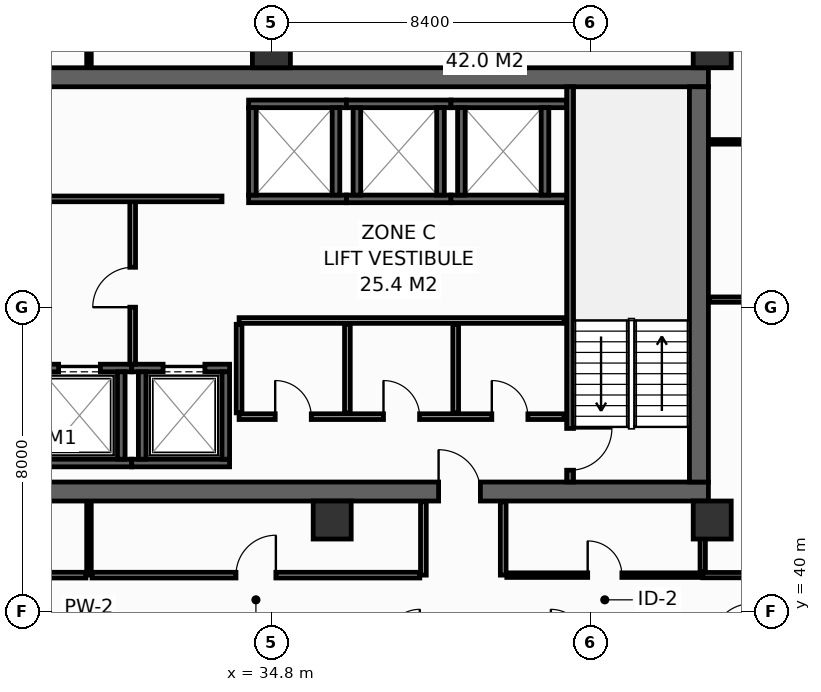
"""IFC4 building model, lengths in metres.
Left out: names, types, materials, properties, quantities, classifications, styles, units other than length and angle.
Written with IfcOpenShell. Run it as: python <this file> out.ifc"""

import sys

from ifc_helpers import new_model, si_unit, direction, frame, frame_2d, origin, origin_2d, place, context, subcontext, project, spatial, rectangle, hollow_rectangle, extrude, element, fill, save


model = new_model("IFC4")
c1 = context("Model", 3, precision=1e-05, world=origin(), true_north=direction((0.0, 1.0)))
c2 = subcontext(c1, "Body", "Model", "MODEL_VIEW")
j1 = project(units=[si_unit("LENGTHUNIT", "METRE"), si_unit("PLANEANGLEUNIT", "RADIAN")], contexts=[c1])
p1 = place(None, origin())
s1 = spatial("IfcSite", under=j1, at=p1, CompositionType="ELEMENT")
p2 = place(p1, origin())
s2 = spatial("IfcBuilding", under=s1, at=p2, CompositionType="ELEMENT")
p3 = place(p2, frame((0.0, 0.0, 141.0)))
s3 = spatial("IfcBuildingStorey", under=s2, at=p3, CompositionType="ELEMENT", Elevation=141.0)
p4 = place(p3, frame((13.6, 43.15, 0.0), z_axis=(0.0, 0.0, 1.0), x_axis=(1.0, 0.0, 0.0)))
e1 = element("IfcWall", 1, at=p4, inside=s3, PredefinedType="SHEAR", context=c2, shape_type="SweptSolid", body=[
    extrude(rectangle(XDim=32.7, YDim=0.5, at=frame_2d((16.35, 0.0))), origin(), (0.0, 0.0, 1.0), 3.55),
])
p5 = place(p4, frame((5.4, 0.0, 0.0)))
e2 = element("IfcOpeningElement", 2, at=p5, cuts=e1, PredefinedType="OPENING", context=c2, shape_type="SweptSolid", body=[
    extrude(rectangle(XDim=1.1, YDim=2.15, at=frame_2d((0.55, 1.075))), frame((0.0, 0.26, 0.0), z_axis=(0.0, -1.0, 0.0), x_axis=(1.0, 0.0, 0.0)), (0.0, 0.0, 1.0), 0.52),
])
p6 = place(p4, frame((25.6, 0.0, 0.0)))
e3 = element("IfcOpeningElement", 3, at=p6, cuts=e1, PredefinedType="OPENING", context=c2, shape_type="SweptSolid", body=[
    extrude(rectangle(XDim=1.1, YDim=2.15, at=frame_2d((0.55, 1.075))), frame((0.0, 0.26, 0.0), z_axis=(0.0, -1.0, 0.0), x_axis=(1.0, 0.0, 0.0)), (0.0, 0.0, 1.0), 0.52),
])
p7 = place(p3, frame((13.6, 54.05, 0.0), z_axis=(0.0, 0.0, 1.0), x_axis=(1.0, 0.0, 0.0)))
e4 = element("IfcWall", 4, at=p7, inside=s3, PredefinedType="SHEAR", context=c2, shape_type="SweptSolid", body=[
    extrude(rectangle(XDim=32.7, YDim=0.5, at=frame_2d((16.35, 0.0))), origin(), (0.0, 0.0, 1.0), 3.55),
])
p8 = place(p3, frame((46.05, 43.4, 0.0), z_axis=(0.0, 0.0, 1.0), x_axis=(0.0, 1.0, 0.0)))
e5 = element("IfcWall", 5, at=p8, inside=s3, PredefinedType="SHEAR", context=c2, shape_type="SweptSolid", body=[
    extrude(rectangle(XDim=10.4, YDim=0.5, at=frame_2d((5.2, 0.0))), origin(), (0.0, 0.0, 1.0), 3.55),
])
for number, where, z_axis, x_axis in (
    (6, (34.8, 54.8, 0.0), (0.0, 0.0, 1.0), (1.0, 0.0, 0.0)),
    (7, (46.4, 54.8, 0.0), (0.0, 0.0, 1.0), (1.0, 0.0, 0.0)),
    (8, (36.4, 42.4, 0.0), (0.0, 0.0, 1.0), (1.0, 0.0, 0.0)),
    (9, (46.4, 42.4, 0.0), (0.0, 0.0, 1.0), (1.0, 0.0, 0.0)),
):
    element("IfcColumn", number, at=place(p3, frame(where, z_axis=z_axis, x_axis=x_axis)), inside=s3, PredefinedType="COLUMN", context=c2, shape_type="SweptSolid", body=[
        extrude(hollow_rectangle(XDim=1.0, YDim=1.0, WallThickness=0.045, at=origin_2d()), origin(), (0.0, 0.0, 1.0), 3.8),
    ])
p9 = place(p3, frame((28.375, 43.9, 0.0), z_axis=(0.0, 0.0, 1.0), x_axis=(1.0, 0.0, 0.0)))
e10 = element("IfcWall", 10, at=p9, inside=s3, PredefinedType="SHEAR", context=c2, shape_type="SweptSolid", body=[
    extrude(rectangle(XDim=2.75, YDim=0.2, at=frame_2d((1.375, 0.0))), origin(), (0.0, 0.0, 1.0), 3.55),
])
p10 = place(p3, frame((28.375, 46.4, 0.0), z_axis=(0.0, 0.0, 1.0), x_axis=(1.0, 0.0, 0.0)))
e11 = element("IfcWall", 11, at=p10, inside=s3, PredefinedType="SHEAR", context=c2, shape_type="SweptSolid", body=[
    extrude(rectangle(XDim=2.75, YDim=0.2, at=frame_2d((1.375, 0.0))), origin(), (0.0, 0.0, 1.0), 3.55),
])
p11 = place(p10, frame((0.825, 0.0, 0.0)))
e12 = element("IfcOpeningElement", 12, at=p11, cuts=e11, PredefinedType="OPENING", context=c2, shape_type="SweptSolid", body=[
    extrude(rectangle(XDim=1.1, YDim=2.2, at=frame_2d((0.55, 1.1))), frame((0.0, 0.11, 0.0), z_axis=(0.0, -1.0, 0.0), x_axis=(1.0, 0.0, 0.0)), (0.0, 0.0, 1.0), 0.22),
])
p12 = place(p3, frame((30.85, 44.0, 0.0), z_axis=(0.0, 0.0, 1.0), x_axis=(0.0, 1.0, 0.0)))
e13 = element("IfcWall", 13, at=p12, inside=s3, PredefinedType="SHEAR", context=c2, shape_type="SweptSolid", body=[
    extrude(rectangle(XDim=2.3, YDim=0.2, at=frame_2d((1.15, 0.0))), origin(), (0.0, 0.0, 1.0), 3.55),
])
p13 = place(p3, frame((31.125, 43.9, 0.0), z_axis=(0.0, 0.0, 1.0), x_axis=(1.0, 0.0, 0.0)))
e14 = element("IfcWall", 14, at=p13, inside=s3, PredefinedType="SHEAR", context=c2, shape_type="SweptSolid", body=[
    extrude(rectangle(XDim=2.575, YDim=0.2, at=frame_2d((1.288, 0.0))), origin(), (0.0, 0.0, 1.0), 3.55),
])
p14 = place(p3, frame((31.125, 46.4, 0.0), z_axis=(0.0, 0.0, 1.0), x_axis=(1.0, 0.0, 0.0)))
e15 = element("IfcWall", 15, at=p14, inside=s3, PredefinedType="SHEAR", context=c2, shape_type="SweptSolid", body=[
    extrude(rectangle(XDim=2.575, YDim=0.2, at=frame_2d((1.288, 0.0))), origin(), (0.0, 0.0, 1.0), 3.55),
])
p15 = place(p14, frame((0.825, 0.0, 0.0)))
e16 = element("IfcOpeningElement", 16, at=p15, cuts=e15, PredefinedType="OPENING", context=c2, shape_type="SweptSolid", body=[
    extrude(rectangle(XDim=1.1, YDim=2.2, at=frame_2d((0.55, 1.1))), frame((0.0, 0.11, 0.0), z_axis=(0.0, -1.0, 0.0), x_axis=(1.0, 0.0, 0.0)), (0.0, 0.0, 1.0), 0.22),
])
for number, where, z_axis, x_axis in (
    (17, (31.4, 44.0, 0.0), (0.0, 0.0, 1.0), (0.0, 1.0, 0.0)),
    (18, (33.6, 44.0, 0.0), (0.0, 0.0, 1.0), (0.0, 1.0, 0.0)),
):
    element("IfcWall", number, at=place(p3, frame(where, z_axis=z_axis, x_axis=x_axis)), inside=s3, PredefinedType="SHEAR", context=c2, shape_type="SweptSolid", body=[
        extrude(rectangle(XDim=2.3, YDim=0.2, at=frame_2d((1.15, 0.0))), origin(), (0.0, 0.0, 1.0), 3.55),
    ])
for number, where, z_axis, x_axis in (
    (19, (34.2, 50.85, 0.0), (0.0, 0.0, 1.0), (1.0, 0.0, 0.0)),
    (20, (34.2, 53.35, 0.0), (0.0, 0.0, 1.0), (1.0, 0.0, 0.0)),
):
    element("IfcWall", number, at=place(p3, frame(where, z_axis=z_axis, x_axis=x_axis)), inside=s3, PredefinedType="SHEAR", context=c2, shape_type="SweptSolid", body=[
        extrude(rectangle(XDim=2.575, YDim=0.2, at=frame_2d((1.288, 0.0))), origin(), (0.0, 0.0, 1.0), 3.55),
    ])
for number, where, z_axis, x_axis in (
    (21, (34.3, 50.95, 0.0), (0.0, 0.0, 1.0), (0.0, 1.0, 0.0)),
    (22, (36.5, 50.95, 0.0), (0.0, 0.0, 1.0), (0.0, 1.0, 0.0)),
):
    element("IfcWall", number, at=place(p3, frame(where, z_axis=z_axis, x_axis=x_axis)), inside=s3, PredefinedType="SHEAR", context=c2, shape_type="SweptSolid", body=[
        extrude(rectangle(XDim=2.3, YDim=0.2, at=frame_2d((1.15, 0.0))), origin(), (0.0, 0.0, 1.0), 3.55),
    ])
for number, where, z_axis, x_axis in (
    (23, (36.775, 50.85, 0.0), (0.0, 0.0, 1.0), (1.0, 0.0, 0.0)),
    (24, (36.775, 53.35, 0.0), (0.0, 0.0, 1.0), (1.0, 0.0, 0.0)),
):
    element("IfcWall", number, at=place(p3, frame(where, z_axis=z_axis, x_axis=x_axis)), inside=s3, PredefinedType="SHEAR", context=c2, shape_type="SweptSolid", body=[
        extrude(rectangle(XDim=2.75, YDim=0.2, at=frame_2d((1.375, 0.0))), origin(), (0.0, 0.0, 1.0), 3.55),
    ])
for number, where, z_axis, x_axis in (
    (25, (37.05, 50.95, 0.0), (0.0, 0.0, 1.0), (0.0, 1.0, 0.0)),
    (26, (39.25, 50.95, 0.0), (0.0, 0.0, 1.0), (0.0, 1.0, 0.0)),
):
    element("IfcWall", number, at=place(p3, frame(where, z_axis=z_axis, x_axis=x_axis)), inside=s3, PredefinedType="SHEAR", context=c2, shape_type="SweptSolid", body=[
        extrude(rectangle(XDim=2.3, YDim=0.2, at=frame_2d((1.15, 0.0))), origin(), (0.0, 0.0, 1.0), 3.55),
    ])
for number, where, z_axis, x_axis in (
    (27, (39.525, 50.85, 0.0), (0.0, 0.0, 1.0), (1.0, 0.0, 0.0)),
    (28, (39.525, 53.35, 0.0), (0.0, 0.0, 1.0), (1.0, 0.0, 0.0)),
):
    element("IfcWall", number, at=place(p3, frame(where, z_axis=z_axis, x_axis=x_axis)), inside=s3, PredefinedType="SHEAR", context=c2, shape_type="SweptSolid", body=[
        extrude(rectangle(XDim=3.045, YDim=0.2, at=frame_2d((1.522, 0.0))), origin(), (0.0, 0.0, 1.0), 3.55),
    ])
for number, where, z_axis, x_axis in (
    (29, (39.8, 50.95, 0.0), (0.0, 0.0, 1.0), (0.0, 1.0, 0.0)),
    (30, (42.0, 50.95, 0.0), (0.0, 0.0, 1.0), (0.0, 1.0, 0.0)),
):
    element("IfcWall", number, at=place(p3, frame(where, z_axis=z_axis, x_axis=x_axis)), inside=s3, PredefinedType="SHEAR", context=c2, shape_type="SweptSolid", body=[
        extrude(rectangle(XDim=2.3, YDim=0.2, at=frame_2d((1.15, 0.0))), origin(), (0.0, 0.0, 1.0), 3.55),
    ])
p16 = place(p3, frame((42.66, 53.8, 0.0), z_axis=(0.0, 0.0, 1.0), x_axis=(0.0, -1.0, 0.0)))
e31 = element("IfcWall", 31, at=p16, inside=s3, PredefinedType="SHEAR", context=c2, shape_type="SweptSolid", body=[
    extrude(rectangle(XDim=10.4, YDim=0.18, at=frame_2d((5.2, 0.0))), origin(), (0.0, 0.0, 1.0), 3.55),
])
p17 = place(p16, frame((8.99, 0.0, 0.0)))
e32 = element("IfcOpeningElement", 32, at=p17, cuts=e31, PredefinedType="OPENING", context=c2, shape_type="SweptSolid", body=[
    extrude(rectangle(XDim=1.1, YDim=2.15, at=frame_2d((0.55, 1.075))), frame((0.0, 0.1, 0.0), z_axis=(0.0, -1.0, 0.0), x_axis=(1.0, 0.0, 0.0)), (0.0, 0.0, 1.0), 0.2),
])
p18 = place(p3, frame((31.15, 46.5, 0.0), z_axis=(0.0, 0.0, 1.0), x_axis=(0.0, 1.0, 0.0)))
e33 = element("IfcWall", 33, at=p18, inside=s3, PredefinedType="PARTITIONING", context=c2, shape_type="SweptSolid", body=[
    extrude(rectangle(XDim=4.35, YDim=0.15, at=frame_2d((2.175, 0.0))), origin(), (0.0, 0.0, 1.0), 3.55),
])
p19 = place(p18, frame((1.5, 0.0, 0.0)))
e34 = element("IfcOpeningElement", 34, at=p19, cuts=e33, PredefinedType="OPENING", context=c2, shape_type="SweptSolid", body=[
    extrude(rectangle(XDim=1.05, YDim=2.15, at=frame_2d((0.525, 1.075))), frame((0.0, 0.085, 0.0), z_axis=(0.0, -1.0, 0.0), x_axis=(1.0, 0.0, 0.0)), (0.0, 0.0, 1.0), 0.17),
])
p20 = place(p3, frame((33.95, 45.12, 0.0), z_axis=(0.0, 0.0, 1.0), x_axis=(1.0, 0.0, 0.0)))
e35 = element("IfcWall", 35, at=p20, inside=s3, PredefinedType="PARTITIONING", context=c2, shape_type="SweptSolid", body=[
    extrude(rectangle(XDim=8.55, YDim=0.15, at=frame_2d((4.275, 0.0))), origin(), (0.0, 0.0, 1.0), 3.55),
])
p21 = place(p20, frame((0.95, 0.0, 0.0)))
e36 = element("IfcOpeningElement", 36, at=p21, cuts=e35, PredefinedType="OPENING", context=c2, shape_type="SweptSolid", body=[
    extrude(rectangle(XDim=0.95, YDim=2.15, at=frame_2d((0.475, 1.075))), frame((0.0, 0.085, 0.0), z_axis=(0.0, -1.0, 0.0), x_axis=(1.0, 0.0, 0.0)), (0.0, 0.0, 1.0), 0.17),
])
p22 = place(p20, frame((3.8, 0.0, 0.0)))
e37 = element("IfcOpeningElement", 37, at=p22, cuts=e35, PredefinedType="OPENING", context=c2, shape_type="SweptSolid", body=[
    extrude(rectangle(XDim=0.95, YDim=2.15, at=frame_2d((0.475, 1.075))), frame((0.0, 0.085, 0.0), z_axis=(0.0, -1.0, 0.0), x_axis=(1.0, 0.0, 0.0)), (0.0, 0.0, 1.0), 0.17),
])
p23 = place(p20, frame((6.65, 0.0, 0.0)))
e38 = element("IfcOpeningElement", 38, at=p23, cuts=e35, PredefinedType="OPENING", context=c2, shape_type="SweptSolid", body=[
    extrude(rectangle(XDim=0.95, YDim=2.15, at=frame_2d((0.475, 1.075))), frame((0.0, 0.085, 0.0), z_axis=(0.0, -1.0, 0.0), x_axis=(1.0, 0.0, 0.0)), (0.0, 0.0, 1.0), 0.17),
])
p24 = place(p3, frame((33.95, 47.65, 0.0), z_axis=(0.0, 0.0, 1.0), x_axis=(1.0, 0.0, 0.0)))
e39 = element("IfcWall", 39, at=p24, inside=s3, PredefinedType="PARTITIONING", context=c2, shape_type="SweptSolid", body=[
    extrude(rectangle(XDim=8.55, YDim=0.15, at=frame_2d((4.275, 0.0))), origin(), (0.0, 0.0, 1.0), 3.55),
])
for number, where, z_axis, x_axis in (
    (40, (33.95, 45.22, 0.0), (0.0, 0.0, 1.0), (0.0, 1.0, 0.0)),
    (41, (36.8, 45.22, 0.0), (0.0, 0.0, 1.0), (0.0, 1.0, 0.0)),
    (42, (39.65, 45.22, 0.0), (0.0, 0.0, 1.0), (0.0, 1.0, 0.0)),
):
    element("IfcWall", number, at=place(p3, frame(where, z_axis=z_axis, x_axis=x_axis)), inside=s3, PredefinedType="PARTITIONING", context=c2, shape_type="SweptSolid", body=[
        extrude(rectangle(XDim=2.33, YDim=0.15, at=frame_2d((1.165, 0.0))), origin(), (0.0, 0.0, 1.0), 3.55),
    ])
p25 = place(p3, frame((25.85, 50.85, 0.0), z_axis=(0.0, 0.0, 1.0), x_axis=(1.0, 0.0, 0.0)))
e43 = element("IfcWall", 43, at=p25, inside=s3, PredefinedType="PARTITIONING", context=c2, shape_type="SweptSolid", body=[
    extrude(rectangle(XDim=7.65, YDim=0.15, at=frame_2d((3.825, 0.0))), origin(), (0.0, 0.0, 1.0), 3.55),
])
p26 = place(p25, frame((1.25, 0.0, 0.0)))
e44 = element("IfcOpeningElement", 44, at=p26, cuts=e43, PredefinedType="OPENING", context=c2, shape_type="SweptSolid", body=[
    extrude(rectangle(XDim=0.95, YDim=2.15, at=frame_2d((0.475, 1.075))), frame((0.0, 0.085, 0.0), z_axis=(0.0, -1.0, 0.0), x_axis=(1.0, 0.0, 0.0)), (0.0, 0.0, 1.0), 0.17),
])
p27 = place(p3, frame((46.15, 40.95, 0.0), z_axis=(0.0, 0.0, 1.0), x_axis=(1.0, 0.0, 0.0)))
e45 = element("IfcWall", 45, at=p27, inside=s3, PredefinedType="PARTITIONING", context=c2, shape_type="SweptSolid", body=[
    extrude(rectangle(XDim=4.05, YDim=0.14, at=frame_2d((2.025, 0.0))), origin(), (0.0, 0.0, 1.0), 3.55),
])
p28 = place(p3, frame((46.15, 41.04, 0.0), z_axis=(0.0, 0.0, 1.0), x_axis=(0.0, 1.0, 0.0)))
e46 = element("IfcWall", 46, at=p28, inside=s3, PredefinedType="PARTITIONING", context=c2, shape_type="SweptSolid", body=[
    extrude(rectangle(XDim=1.84, YDim=0.14, at=frame_2d((0.92, 0.0))), origin(), (0.0, 0.0, 1.0), 3.55),
])
p29 = place(p3, frame((46.32, 48.2, 0.0), z_axis=(0.0, 0.0, 1.0), x_axis=(1.0, 0.0, 0.0)))
e47 = element("IfcWall", 47, at=p29, inside=s3, PredefinedType="PARTITIONING", context=c2, shape_type="SweptSolid", body=[
    extrude(rectangle(XDim=3.88, YDim=0.14, at=frame_2d((1.94, 0.0))), origin(), (0.0, 0.0, 1.0), 3.55),
])
p30 = place(p3, frame((46.32, 52.35, 0.0), z_axis=(0.0, 0.0, 1.0), x_axis=(1.0, 0.0, 0.0)))
e48 = element("IfcWall", 48, at=p30, inside=s3, PredefinedType="PARTITIONING", context=c2, shape_type="SweptSolid", body=[
    extrude(rectangle(XDim=3.88, YDim=0.12, at=frame_2d((1.94, 0.0))), origin(), (0.0, 0.0, 1.0), 3.55),
])
p31 = place(p3, frame((30.0, 54.32, 0.0), z_axis=(0.0, 0.0, 1.0), x_axis=(0.0, 1.0, 0.0)))
e49 = element("IfcWall", 49, at=p31, inside=s3, PredefinedType="PARTITIONING", context=c2, shape_type="SweptSolid", body=[
    extrude(rectangle(XDim=1.675, YDim=0.12, at=frame_2d((0.837, 0.0))), origin(), (0.0, 0.0, 1.0), 2.935),
])
for number, where, z_axis, x_axis in (
    (50, (38.8, 40.95, 0.0), (0.0, 0.0, 1.0), (0.0, 1.0, 0.0)),
    (51, (40.9, 40.95, 0.0), (0.0, 0.0, 1.0), (0.0, 1.0, 0.0)),
):
    element("IfcWall", number, at=place(p3, frame(where, z_axis=z_axis, x_axis=x_axis)), inside=s3, PredefinedType="PARTITIONING", context=c2, shape_type="SweptSolid", body=[
        extrude(rectangle(XDim=1.93, YDim=0.15, at=frame_2d((0.965, 0.0))), origin(), (0.0, 0.0, 1.0), 3.55),
    ])
p32 = place(p3, frame((30.0, 40.95, 0.0), z_axis=(0.0, 0.0, 1.0), x_axis=(0.0, 1.0, 0.0)))
e52 = element("IfcWall", 52, at=p32, inside=s3, PredefinedType="PARTITIONING", context=c2, shape_type="SweptSolid", body=[
    extrude(rectangle(XDim=1.93, YDim=0.12, at=frame_2d((0.965, 0.0))), origin(), (0.0, 0.0, 1.0), 2.835),
])
p33 = place(p3, frame((20.795, 40.95, 0.0), z_axis=(0.0, 0.0, 1.0), x_axis=(1.0, 0.0, 0.0)))
e53 = element("IfcWall", 53, at=p33, inside=s3, PredefinedType="PARTITIONING", context=c2, shape_type="SweptSolid", body=[
    extrude(rectangle(XDim=9.125, YDim=0.15, at=frame_2d((4.562, 0.0))), origin(), (0.0, 0.0, 1.0), 2.835),
])
p34 = place(p33, frame((4.062, 0.0, 0.0)))
e54 = element("IfcOpeningElement", 54, at=p34, cuts=e53, PredefinedType="OPENING", context=c2, shape_type="SweptSolid", body=[
    extrude(rectangle(XDim=1.0, YDim=2.15, at=frame_2d((0.5, 1.075))), frame((0.0, 0.085, 0.0), z_axis=(0.0, -1.0, 0.0), x_axis=(1.0, 0.0, 0.0)), (0.0, 0.0, 1.0), 0.17),
])
p35 = place(p3, frame((30.08, 40.95, 0.0), z_axis=(0.0, 0.0, 1.0), x_axis=(1.0, 0.0, 0.0)))
e55 = element("IfcWall", 55, at=p35, inside=s3, PredefinedType="PARTITIONING", context=c2, shape_type="SweptSolid", body=[
    extrude(rectangle(XDim=8.625, YDim=0.15, at=frame_2d((4.312, 0.0))), origin(), (0.0, 0.0, 1.0), 2.835),
])
p36 = place(p35, frame((3.788, 0.0, 0.0)))
e56 = element("IfcOpeningElement", 56, at=p36, cuts=e55, PredefinedType="OPENING", context=c2, shape_type="SweptSolid", body=[
    extrude(rectangle(XDim=1.05, YDim=2.15, at=frame_2d((0.525, 1.075))), frame((0.0, 0.085, 0.0), z_axis=(0.0, -1.0, 0.0), x_axis=(1.0, 0.0, 0.0)), (0.0, 0.0, 1.0), 0.17),
])
p37 = place(p3, frame((40.995, 40.95, 0.0), z_axis=(0.0, 0.0, 1.0), x_axis=(1.0, 0.0, 0.0)))
e57 = element("IfcWall", 57, at=p37, inside=s3, PredefinedType="PARTITIONING", context=c2, shape_type="SweptSolid", body=[
    extrude(rectangle(XDim=5.155, YDim=0.12, at=frame_2d((2.577, 0.0))), origin(), (0.0, 0.0, 1.0), 3.55),
])
p38 = place(p37, frame((2.128, 0.0, 0.0)))
e58 = element("IfcOpeningElement", 58, at=p38, cuts=e57, PredefinedType="OPENING", context=c2, shape_type="SweptSolid", body=[
    extrude(rectangle(XDim=0.9, YDim=2.1, at=frame_2d((0.45, 1.05))), frame((0.0, 0.07, 0.0), z_axis=(0.0, -1.0, 0.0), x_axis=(1.0, 0.0, 0.0)), (0.0, 0.0, 1.0), 0.14),
])
p39 = place(p11, origin())
e59 = element("IfcDoor", 59, at=p39, inside=s3, OperationType="SLIDING_TO_LEFT", PredefinedType="DOOR", context=c2, shape_type="SweptSolid", body=[
    extrude(rectangle(XDim=1.1, YDim=2.2, at=frame_2d((0.55, 1.1))), frame((0.0, 0.025, 0.0), z_axis=(0.0, -1.0, 0.0), x_axis=(1.0, 0.0, 0.0)), (0.0, 0.0, 1.0), 0.05),
])
fill(e12, e59)
p40 = place(p15, origin())
e60 = element("IfcDoor", 60, at=p40, inside=s3, OperationType="SLIDING_TO_LEFT", PredefinedType="DOOR", context=c2, shape_type="SweptSolid", body=[
    extrude(rectangle(XDim=1.1, YDim=2.2, at=frame_2d((0.55, 1.1))), frame((0.0, 0.025, 0.0), z_axis=(0.0, -1.0, 0.0), x_axis=(1.0, 0.0, 0.0)), (0.0, 0.0, 1.0), 0.05),
])
fill(e16, e60)
p41 = place(p17, origin())
e61 = element("IfcDoor", 61, at=p41, inside=s3, OperationType="SINGLE_SWING_LEFT", PredefinedType="DOOR", context=c2, shape_type="SweptSolid", body=[
    extrude(rectangle(XDim=1.1, YDim=2.15, at=frame_2d((0.55, 1.075))), frame((0.0, 0.025, 0.0), z_axis=(0.0, -1.0, 0.0), x_axis=(1.0, 0.0, 0.0)), (0.0, 0.0, 1.0), 0.05),
])
fill(e32, e61)
p42 = place(p6, origin())
e62 = element("IfcDoor", 62, at=p42, inside=s3, OperationType="SINGLE_SWING_LEFT", PredefinedType="DOOR", context=c2, shape_type="SweptSolid", body=[
    extrude(rectangle(XDim=1.1, YDim=2.15, at=frame_2d((0.55, 1.075))), frame((0.0, 0.025, 0.0), z_axis=(0.0, -1.0, 0.0), x_axis=(1.0, 0.0, 0.0)), (0.0, 0.0, 1.0), 0.05),
])
fill(e3, e62)
p43 = place(p19, origin())
e63 = element("IfcDoor", 63, at=p43, inside=s3, OperationType="SINGLE_SWING_LEFT", PredefinedType="DOOR", context=c2, shape_type="SweptSolid", body=[
    extrude(rectangle(XDim=1.05, YDim=2.15, at=frame_2d((0.525, 1.075))), frame((0.0, 0.025, 0.0), z_axis=(0.0, -1.0, 0.0), x_axis=(1.0, 0.0, 0.0)), (0.0, 0.0, 1.0), 0.05),
])
fill(e34, e63)
p44 = place(p21, origin())
e64 = element("IfcDoor", 64, at=p44, inside=s3, OperationType="SINGLE_SWING_LEFT", PredefinedType="DOOR", context=c2, shape_type="SweptSolid", body=[
    extrude(rectangle(XDim=0.95, YDim=2.15, at=frame_2d((0.475, 1.075))), frame((0.0, 0.025, 0.0), z_axis=(0.0, -1.0, 0.0), x_axis=(1.0, 0.0, 0.0)), (0.0, 0.0, 1.0), 0.05),
])
fill(e36, e64)
p45 = place(p22, origin())
e65 = element("IfcDoor", 65, at=p45, inside=s3, OperationType="SINGLE_SWING_LEFT", PredefinedType="DOOR", context=c2, shape_type="SweptSolid", body=[
    extrude(rectangle(XDim=0.95, YDim=2.15, at=frame_2d((0.475, 1.075))), frame((0.0, 0.025, 0.0), z_axis=(0.0, -1.0, 0.0), x_axis=(1.0, 0.0, 0.0)), (0.0, 0.0, 1.0), 0.05),
])
fill(e37, e65)
p46 = place(p23, origin())
e66 = element("IfcDoor", 66, at=p46, inside=s3, OperationType="SINGLE_SWING_LEFT", PredefinedType="DOOR", context=c2, shape_type="SweptSolid", body=[
    extrude(rectangle(XDim=0.95, YDim=2.15, at=frame_2d((0.475, 1.075))), frame((0.0, 0.025, 0.0), z_axis=(0.0, -1.0, 0.0), x_axis=(1.0, 0.0, 0.0)), (0.0, 0.0, 1.0), 0.05),
])
fill(e38, e66)
p47 = place(p36, origin())
e67 = element("IfcDoor", 67, at=p47, inside=s3, OperationType="SINGLE_SWING_RIGHT", PredefinedType="DOOR", context=c2, shape_type="SweptSolid", body=[
    extrude(rectangle(XDim=1.05, YDim=2.15, at=frame_2d((0.525, 1.075))), frame((0.0, 0.025, 0.0), z_axis=(0.0, -1.0, 0.0), x_axis=(1.0, 0.0, 0.0)), (0.0, 0.0, 1.0), 0.05),
])
fill(e56, e67)
p48 = place(p38, origin())
e68 = element("IfcDoor", 68, at=p48, inside=s3, OperationType="SINGLE_SWING_LEFT", PredefinedType="DOOR", context=c2, shape_type="SweptSolid", body=[
    extrude(rectangle(XDim=0.9, YDim=2.1, at=frame_2d((0.45, 1.05))), frame((0.0, 0.025, 0.0), z_axis=(0.0, -1.0, 0.0), x_axis=(1.0, 0.0, 0.0)), (0.0, 0.0, 1.0), 0.05),
])
fill(e58, e68)
save(model, sys.argv[1])
